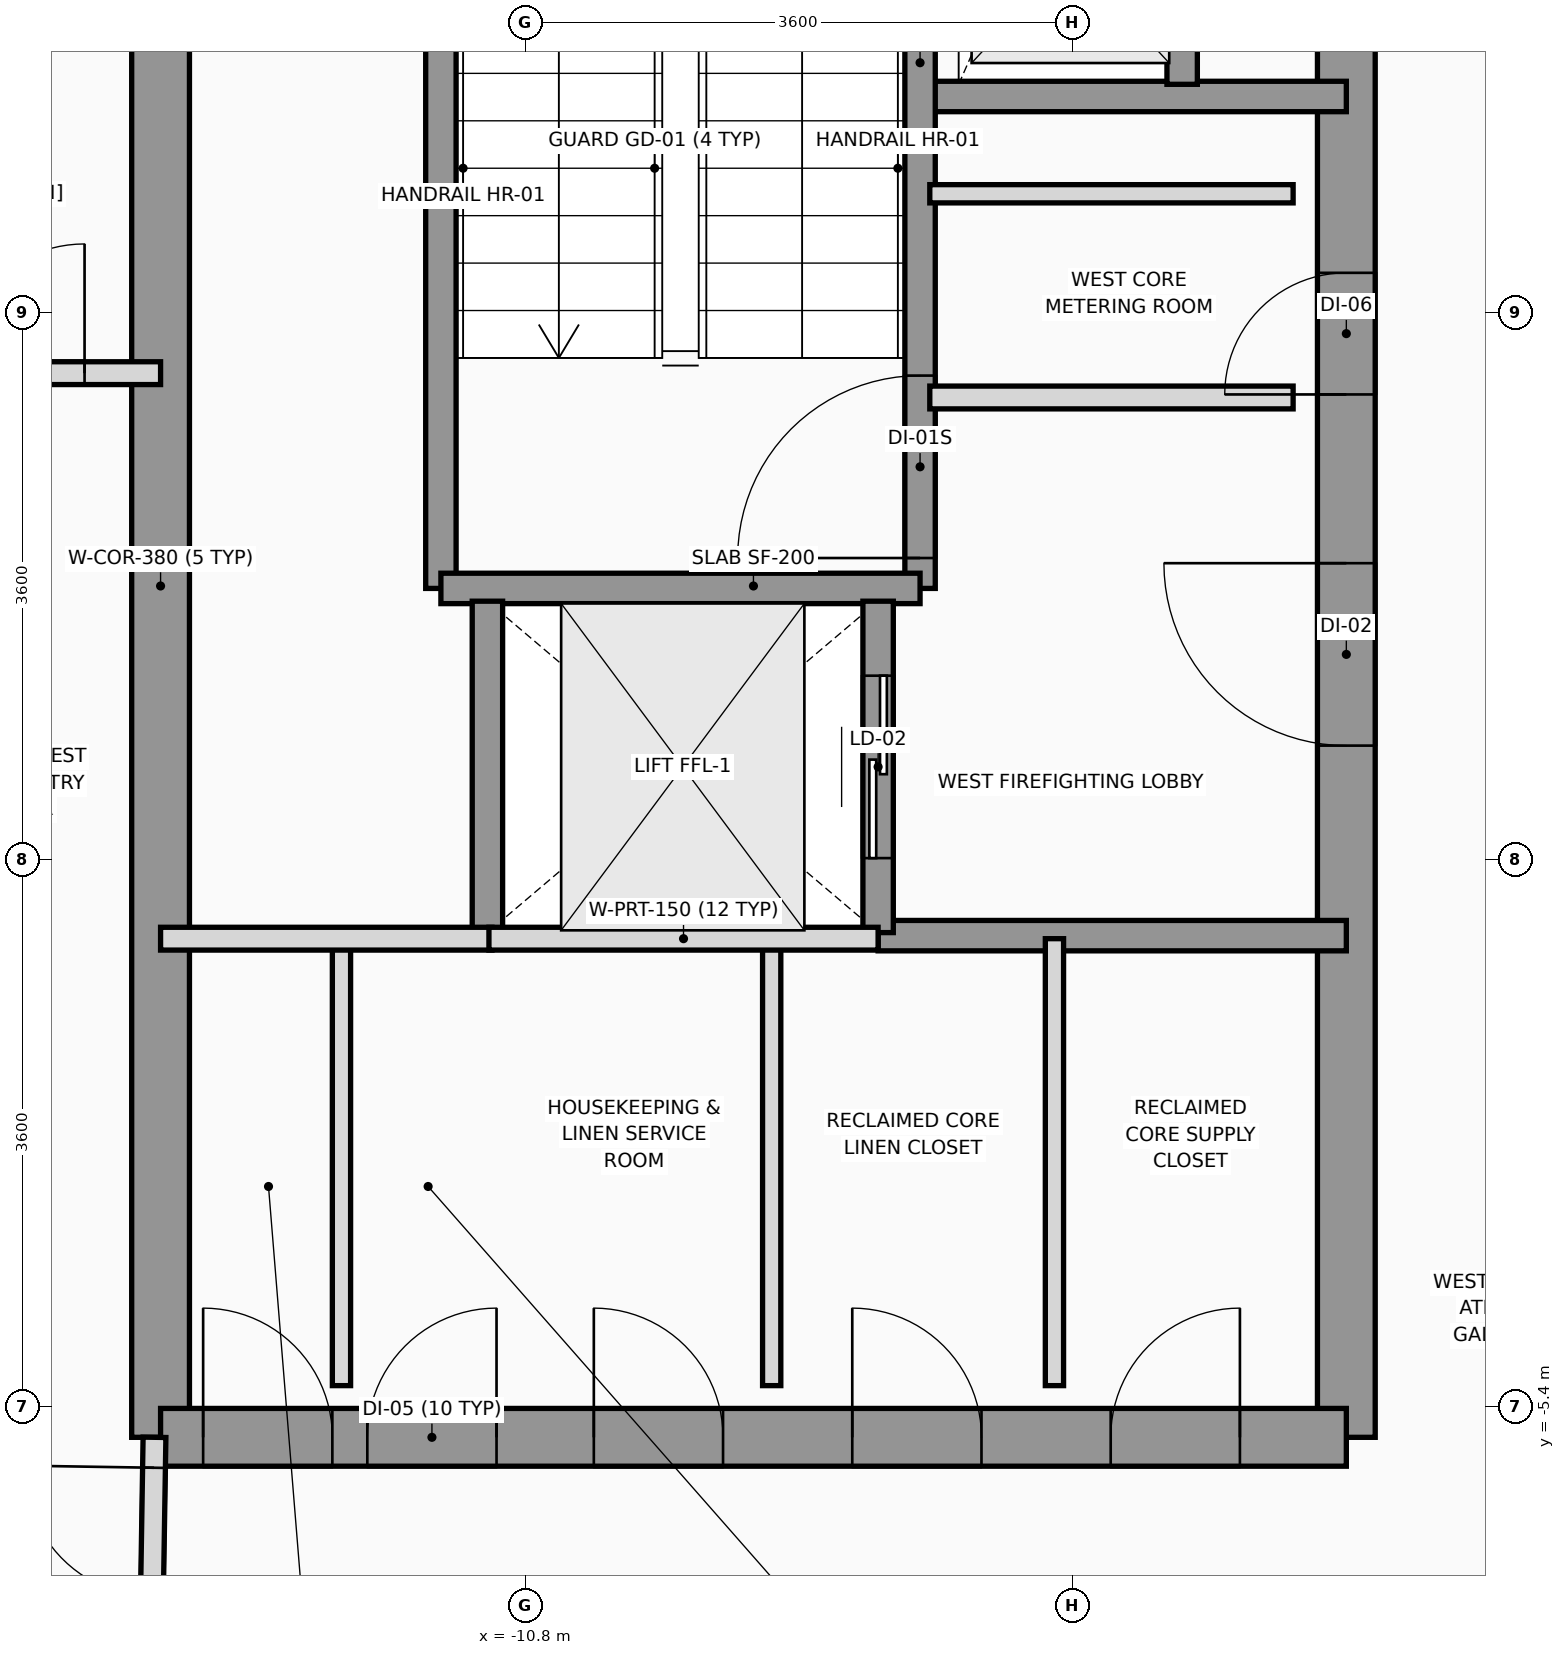
"""IFC4 building model, lengths in metres.
Left out: names, types, materials, properties, quantities, classifications, styles, units other than length and angle.
Written with IfcOpenShell. Run it as: python <this file> out.ifc"""

import sys

from ifc_helpers import new_model, si_unit, direction, frame, frame_2d, origin, place, context, subcontext, project, spatial, rectangle, extrude, source, transform, mapped, element, fill, save


model = new_model("IFC4")
c1 = context("Model", 3, precision=1e-05, world=origin(), true_north=direction((0.0, 1.0)))
c2 = subcontext(c1, "Body", "Model", "MODEL_VIEW")
j1 = project(units=[si_unit("LENGTHUNIT", "METRE"), si_unit("PLANEANGLEUNIT", "RADIAN")], contexts=[c1])
p1 = place(None, origin())
s1 = spatial("IfcSite", under=j1, at=p1, CompositionType="ELEMENT")
p2 = place(p1, origin())
s2 = spatial("IfcBuilding", under=s1, at=p2, CompositionType="ELEMENT")
p3 = place(p2, frame((0.0, 0.0, 184.2)))
s3 = spatial("IfcBuildingStorey", under=s2, at=p3, CompositionType="ELEMENT", Elevation=184.2)
p4 = place(p3, frame((-13.2, -5.6, 0.0), z_axis=(0.0, 0.0, 1.0), x_axis=(0.0, 1.0, 0.0)))
e1 = element("IfcWall", 1, at=p4, inside=s3, PredefinedType="SHEAR", context=c2, shape_type="SweptSolid", body=[
    extrude(rectangle(XDim=11.2, YDim=0.38, at=frame_2d((5.6, 0.0))), origin(), (0.0, 0.0, 1.0), 3.2),
])
p5 = place(p3, frame((-5.4, -5.6, 0.0), z_axis=(0.0, 0.0, 1.0), x_axis=(0.0, 1.0, 0.0)))
e2 = element("IfcWall", 2, at=p5, inside=s3, PredefinedType="SHEAR", context=c2, shape_type="SweptSolid", body=[
    extrude(rectangle(XDim=12.5, YDim=0.38, at=frame_2d((6.25, 0.0))), origin(), (0.0, 0.0, 1.0), 3.2),
])
p6 = place(p5, frame((4.55, 0.0, 0.0)))
e3 = element("IfcOpeningElement", 3, at=p6, cuts=e2, PredefinedType="OPENING", context=c2, shape_type="SweptSolid", body=[
    extrude(rectangle(XDim=1.2, YDim=2.2, at=frame_2d((0.6, 1.1))), frame((0.0, 0.2, 0.0), z_axis=(0.0, -1.0, 0.0), x_axis=(1.0, 0.0, 0.0)), (0.0, 0.0, 1.0), 0.4),
])
p7 = place(p5, frame((10.45, 0.0, 0.0)))
e4 = element("IfcOpeningElement", 4, at=p7, cuts=e2, PredefinedType="OPENING", context=c2, shape_type="SweptSolid", body=[
    extrude(rectangle(XDim=1.2, YDim=2.2, at=frame_2d((0.6, 1.1))), frame((0.0, 0.2, 0.0), z_axis=(0.0, -1.0, 0.0), x_axis=(1.0, 0.0, 0.0)), (0.0, 0.0, 1.0), 0.4),
])
p8 = place(p5, frame((6.86, 0.0, 0.0)))
e5 = element("IfcOpeningElement", 5, at=p8, cuts=e2, PredefinedType="OPENING", context=c2, shape_type="SweptSolid", body=[
    extrude(rectangle(XDim=0.8, YDim=2.1, at=frame_2d((0.4, 1.05))), frame((0.0, 0.2, 0.0), z_axis=(0.0, -1.0, 0.0), x_axis=(1.0, 0.0, 0.0)), (0.0, 0.0, 1.0), 0.4),
])
p9 = place(p3, frame((-13.2, -5.6, 0.0), z_axis=(0.0, 0.0, 1.0), x_axis=(1.0, 0.0, 0.0)))
e6 = element("IfcWall", 6, at=p9, inside=s3, PredefinedType="SHEAR", context=c2, shape_type="SweptSolid", body=[
    extrude(rectangle(XDim=7.8, YDim=0.38, at=frame_2d((3.9, 0.0))), origin(), (0.0, 0.0, 1.0), 3.2),
])
p10 = place(p9, frame((0.28, 0.0, 0.0)))
e7 = element("IfcOpeningElement", 7, at=p10, cuts=e6, PredefinedType="OPENING", context=c2, shape_type="SweptSolid", body=[
    extrude(rectangle(XDim=0.85, YDim=2.1, at=frame_2d((0.425, 1.05))), frame((0.0, 0.2, 0.0), z_axis=(0.0, -1.0, 0.0), x_axis=(1.0, 0.0, 0.0)), (0.0, 0.0, 1.0), 0.4),
])
p11 = place(p9, frame((1.36, 0.0, 0.0)))
e8 = element("IfcOpeningElement", 8, at=p11, cuts=e6, PredefinedType="OPENING", context=c2, shape_type="SweptSolid", body=[
    extrude(rectangle(XDim=0.85, YDim=2.1, at=frame_2d((0.425, 1.05))), frame((0.0, 0.2, 0.0), z_axis=(0.0, -1.0, 0.0), x_axis=(1.0, 0.0, 0.0)), (0.0, 0.0, 1.0), 0.4),
])
p12 = place(p9, frame((2.85, 0.0, 0.0)))
e9 = element("IfcOpeningElement", 9, at=p12, cuts=e6, PredefinedType="OPENING", context=c2, shape_type="SweptSolid", body=[
    extrude(rectangle(XDim=0.85, YDim=2.1, at=frame_2d((0.425, 1.05))), frame((0.0, 0.2, 0.0), z_axis=(0.0, -1.0, 0.0), x_axis=(1.0, 0.0, 0.0)), (0.0, 0.0, 1.0), 0.4),
])
p13 = place(p9, frame((4.55, 0.0, 0.0)))
e10 = element("IfcOpeningElement", 10, at=p13, cuts=e6, PredefinedType="OPENING", context=c2, shape_type="SweptSolid", body=[
    extrude(rectangle(XDim=0.85, YDim=2.1, at=frame_2d((0.425, 1.05))), frame((0.0, 0.2, 0.0), z_axis=(0.0, -1.0, 0.0), x_axis=(1.0, 0.0, 0.0)), (0.0, 0.0, 1.0), 0.4),
])
p14 = place(p9, frame((6.25, 0.0, 0.0)))
e11 = element("IfcOpeningElement", 11, at=p14, cuts=e6, PredefinedType="OPENING", context=c2, shape_type="SweptSolid", body=[
    extrude(rectangle(XDim=0.85, YDim=2.1, at=frame_2d((0.425, 1.05))), frame((0.0, 0.2, 0.0), z_axis=(0.0, -1.0, 0.0), x_axis=(1.0, 0.0, 0.0)), (0.0, 0.0, 1.0), 0.4),
])
p15 = place(p3, frame((-8.18, 3.22, 0.0), z_axis=(0.0, 0.0, 1.0), x_axis=(1.0, 0.0, 0.0)))
e12 = element("IfcWall", 12, at=p15, inside=s3, PredefinedType="SOLIDWALL", context=c2, shape_type="SweptSolid", body=[
    extrude(rectangle(XDim=2.78, YDim=0.2, at=frame_2d((1.39, 0.0))), origin(), (0.0, 0.0, 1.0), 3.2),
])
p16 = place(p3, frame((-8.48, -2.3, 0.0), z_axis=(0.0, 0.0, 1.0), x_axis=(1.0, 0.0, 0.0)))
e13 = element("IfcWall", 13, at=p16, inside=s3, PredefinedType="SOLIDWALL", context=c2, shape_type="SweptSolid", body=[
    extrude(rectangle(XDim=3.08, YDim=0.2, at=frame_2d((1.54, 0.0))), origin(), (0.0, 0.0, 1.0), 3.2),
])
p17 = place(p3, frame((-8.204, -0.016, 0.0), z_axis=(0.0, 0.0, 1.0), x_axis=(0.0, 1.0, 0.0)))
e14 = element("IfcWall", 14, at=p17, inside=s3, PredefinedType="SOLIDWALL", context=c2, shape_type="SweptSolid", body=[
    extrude(rectangle(XDim=6.916, YDim=0.2, at=frame_2d((3.458, 0.0))), origin(), (0.0, 0.0, 1.0), 3.2),
])
p18 = place(p17, frame((0.2, 0.0, 0.0)))
e15 = element("IfcOpeningElement", 15, at=p18, cuts=e14, PredefinedType="OPENING", context=c2, shape_type="SweptSolid", body=[
    extrude(rectangle(XDim=1.2, YDim=2.2, at=frame_2d((0.6, 1.1))), frame((0.0, 0.11, 0.0), z_axis=(0.0, -1.0, 0.0), x_axis=(1.0, 0.0, 0.0)), (0.0, 0.0, 1.0), 0.22),
])
p19 = place(p3, frame((-11.356, -0.016, 0.0), z_axis=(0.0, 0.0, 1.0), x_axis=(0.0, 1.0, 0.0)))
e16 = element("IfcWall", 16, at=p19, inside=s3, PredefinedType="SOLIDWALL", context=c2, shape_type="SweptSolid", body=[
    extrude(rectangle(XDim=6.916, YDim=0.2, at=frame_2d((3.458, 0.0))), origin(), (0.0, 0.0, 1.0), 3.2),
])
p20 = place(p3, frame((-11.356, -0.016, 0.0), z_axis=(0.0, 0.0, 1.0), x_axis=(1.0, 0.0, 0.0)))
e17 = element("IfcWall", 17, at=p20, inside=s3, PredefinedType="SOLIDWALL", context=c2, shape_type="SweptSolid", body=[
    extrude(rectangle(XDim=3.152, YDim=0.2, at=frame_2d((1.576, 0.0))), origin(), (0.0, 0.0, 1.0), 3.2),
])
p21 = place(p3, frame((-11.05, -2.28, 0.0), z_axis=(0.0, 0.0, 1.0), x_axis=(0.0, 1.0, 0.0)))
e18 = element("IfcWall", 18, at=p21, inside=s3, PredefinedType="SOLIDWALL", context=c2, shape_type="SweptSolid", body=[
    extrude(rectangle(XDim=2.18, YDim=0.2, at=frame_2d((1.09, 0.0))), origin(), (0.0, 0.0, 1.0), 3.2),
])
p22 = place(p3, frame((-8.48, -2.28, 0.0), z_axis=(0.0, 0.0, 1.0), x_axis=(0.0, 1.0, 0.0)))
e19 = element("IfcWall", 19, at=p22, inside=s3, PredefinedType="SOLIDWALL", context=c2, shape_type="SweptSolid", body=[
    extrude(rectangle(XDim=2.18, YDim=0.2, at=frame_2d((1.09, 0.0))), origin(), (0.0, 0.0, 1.0), 3.2),
])
p23 = place(p22, frame((0.49, 0.0, 0.0)))
e20 = element("IfcOpeningElement", 20, at=p23, cuts=e19, PredefinedType="OPENING", context=c2, shape_type="SweptSolid", body=[
    extrude(rectangle(XDim=1.2, YDim=2.2, at=frame_2d((0.6, 1.1))), frame((0.0, 0.11, 0.0), z_axis=(0.0, -1.0, 0.0), x_axis=(1.0, 0.0, 0.0)), (0.0, 0.0, 1.0), 0.22),
])
p24 = place(p3, frame((-6.48, 3.3, 0.0), z_axis=(0.0, 0.0, 1.0), x_axis=(0.0, 1.0, 0.0)))
e21 = element("IfcWall", 21, at=p24, inside=s3, PredefinedType="SOLIDWALL", context=c2, shape_type="SweptSolid", body=[
    extrude(rectangle(XDim=1.68, YDim=0.2, at=frame_2d((0.84, 0.0))), origin(), (0.0, 0.0, 1.0), 3.2),
])
p25 = place(p24, frame((0.29, 0.0, 0.0)))
e22 = element("IfcOpeningElement", 22, at=p25, cuts=e21, PredefinedType="OPENING", context=c2, shape_type="SweptSolid", body=[
    extrude(rectangle(XDim=1.1, YDim=2.2, at=frame_2d((0.55, 1.1))), frame((0.0, 0.11, 0.0), z_axis=(0.0, -1.0, 0.0), x_axis=(1.0, 0.0, 0.0)), (0.0, 0.0, 1.0), 0.22),
])
p26 = place(p3, frame((-8.14, 1.24, 0.0), z_axis=(0.0, 0.0, 1.0), x_axis=(1.0, 0.0, 0.0)))
e23 = element("IfcWall", 23, at=p26, inside=s3, PredefinedType="PARTITIONING", context=c2, shape_type="SweptSolid", body=[
    extrude(rectangle(XDim=2.39, YDim=0.15, at=frame_2d((1.195, 0.0))), origin(), (0.0, 0.0, 1.0), 2.3),
])
p27 = place(p3, frame((-8.14, 2.58, 0.0), z_axis=(0.0, 0.0, 1.0), x_axis=(1.0, 0.0, 0.0)))
e24 = element("IfcWall", 24, at=p27, inside=s3, PredefinedType="PARTITIONING", context=c2, shape_type="SweptSolid", body=[
    extrude(rectangle(XDim=2.39, YDim=0.12, at=frame_2d((1.195, 0.0))), origin(), (0.0, 0.0, 1.0), 2.3),
])
p28 = place(p3, frame((-12.01, -5.26, 0.0), z_axis=(0.0, 0.0, 1.0), x_axis=(0.0, 1.0, 0.0)))
e25 = element("IfcWall", 25, at=p28, inside=s3, PredefinedType="PARTITIONING", context=c2, shape_type="SweptSolid", body=[
    extrude(rectangle(XDim=2.94, YDim=0.12, at=frame_2d((1.47, 0.0))), origin(), (0.0, 0.0, 1.0), 3.2),
])
p29 = place(p3, frame((-13.2, -2.32, 0.0), z_axis=(0.0, 0.0, 1.0), x_axis=(1.0, 0.0, 0.0)))
e26 = element("IfcWall", 26, at=p29, inside=s3, PredefinedType="PARTITIONING", context=c2, shape_type="SweptSolid", body=[
    extrude(rectangle(XDim=2.18, YDim=0.15, at=frame_2d((1.09, 0.0))), origin(), (0.0, 0.0, 1.0), 3.2),
])
for number, where, z_axis, x_axis in (
    (27, (-9.18, -5.26, 0.0), (0.0, 0.0, 1.0), (0.0, 1.0, 0.0)),
    (28, (-7.32, -5.26, 0.0), (0.0, 0.0, 1.0), (0.0, 1.0, 0.0)),
):
    element("IfcWall", number, at=place(p3, frame(where, z_axis=z_axis, x_axis=x_axis)), inside=s3, PredefinedType="PARTITIONING", context=c2, shape_type="SweptSolid", body=[
        extrude(rectangle(XDim=2.94, YDim=0.12, at=frame_2d((1.47, 0.0))), origin(), (0.0, 0.0, 1.0), 3.2),
    ])
p30 = place(p3, frame((-11.04, -2.32, 0.0), z_axis=(0.0, 0.0, 1.0), x_axis=(1.0, 0.0, 0.0)))
e29 = element("IfcWall", 29, at=p30, inside=s3, PredefinedType="PARTITIONING", context=c2, shape_type="SweptSolid", body=[
    extrude(rectangle(XDim=2.56, YDim=0.15, at=frame_2d((1.28, 0.0))), origin(), (0.0, 0.0, 1.0), 3.2),
])
p31 = place(p3, frame((-13.26, -6.85, 0.0), z_axis=(0.0, 0.0, 1.0), x_axis=(0.016013571389, 0.999871774545, 0.0)))
e30 = element("IfcWall", 30, at=p31, inside=s3, PredefinedType="PARTITIONING", context=c2, shape_type="SweptSolid", body=[
    extrude(rectangle(XDim=1.25, YDim=0.15, at=frame_2d((0.625, 0.0))), origin(), (0.0, 0.0, 1.0), 3.2),
])
p32 = place(p31, frame((0.2, 0.0, 0.0)))
e31 = element("IfcOpeningElement", 31, at=p32, cuts=e30, PredefinedType="OPENING", context=c2, shape_type="SweptSolid", body=[
    extrude(rectangle(XDim=0.85, YDim=2.1, at=frame_2d((0.425, 1.05))), frame((0.0, 0.085, 0.0), z_axis=(0.0, -1.0, 0.0), x_axis=(1.0, 0.0, 0.0)), (0.0, 0.0, 1.0), 0.17),
])
p33 = place(p3, frame((-17.65, 1.4, 0.0), z_axis=(0.0, 0.0, 1.0), x_axis=(1.0, 0.0, 0.0)))
e32 = element("IfcWall", 32, at=p33, inside=s3, PredefinedType="PARTITIONING", context=c2, shape_type="SweptSolid", body=[
    extrude(rectangle(XDim=4.45, YDim=0.15, at=frame_2d((2.225, 0.0))), origin(), (0.0, 0.0, 1.0), 2.8),
])
p34 = place(p33, frame((3.1, 0.0, 0.0)))
e33 = element("IfcOpeningElement", 33, at=p34, cuts=e32, PredefinedType="OPENING", context=c2, shape_type="SweptSolid", body=[
    extrude(rectangle(XDim=0.85, YDim=2.1, at=frame_2d((0.425, 1.05))), frame((0.0, 0.085, 0.0), z_axis=(0.0, -1.0, 0.0), x_axis=(1.0, 0.0, 0.0)), (0.0, 0.0, 1.0), 0.17),
])
m1 = source(origin(), c2, "Body", "SweptSolid", [
    extrude(rectangle(XDim=1.2, YDim=2.2, at=frame_2d((0.6, 1.1))), frame((0.0, 0.025, 0.0), z_axis=(0.0, -1.0, 0.0), x_axis=(1.0, 0.0, 0.0)), (0.0, 0.0, 1.0), 0.05),
])
p35 = place(p18, origin())
e34 = element("IfcDoor", 34, at=p35, inside=s3, OperationType="SINGLE_SWING_LEFT", PredefinedType="DOOR", context=c2, shape_type="MappedRepresentation", body=[
    mapped(m1, transform((0.0, 0.0, 0.0), x_axis=(1.0, 0.0, 0.0), y_axis=(0.0, 1.0, 0.0), z_axis=(0.0, 0.0, 1.0), scale=1.0)),
])
fill(e15, e34)
p36 = place(p6, origin())
e35 = element("IfcDoor", 35, at=p36, inside=s3, OperationType="SINGLE_SWING_RIGHT", PredefinedType="DOOR", context=c2, shape_type="MappedRepresentation", body=[
    mapped(m1, transform((0.0, 0.0, 0.0), x_axis=(1.0, 0.0, 0.0), y_axis=(0.0, 1.0, 0.0), z_axis=(0.0, 0.0, 1.0), scale=1.0)),
])
fill(e3, e35)
m2 = source(origin(), c2, "Body", "SweptSolid", [
    extrude(rectangle(XDim=0.8, YDim=2.1, at=frame_2d((0.4, 1.05))), frame((0.0, 0.025, 0.0), z_axis=(0.0, -1.0, 0.0), x_axis=(1.0, 0.0, 0.0)), (0.0, 0.0, 1.0), 0.05),
])
p37 = place(p8, origin())
e36 = element("IfcDoor", 36, at=p37, inside=s3, OperationType="SINGLE_SWING_LEFT", PredefinedType="DOOR", context=c2, shape_type="MappedRepresentation", body=[
    mapped(m2, transform((0.0, 0.0, 0.0), x_axis=(1.0, 0.0, 0.0), y_axis=(0.0, 1.0, 0.0), z_axis=(0.0, 0.0, 1.0), scale=1.0)),
])
fill(e5, e36)
m3 = source(origin(), c2, "Body", "SweptSolid", [
    extrude(rectangle(XDim=0.85, YDim=2.1, at=frame_2d((0.425, 1.05))), frame((0.0, 0.025, 0.0), z_axis=(0.0, -1.0, 0.0), x_axis=(1.0, 0.0, 0.0)), (0.0, 0.0, 1.0), 0.05),
])
p38 = place(p10, origin())
e37 = element("IfcDoor", 37, at=p38, inside=s3, OperationType="SINGLE_SWING_LEFT", PredefinedType="DOOR", context=c2, shape_type="MappedRepresentation", body=[
    mapped(m3, transform((0.0, 0.0, 0.0), x_axis=(1.0, 0.0, 0.0), y_axis=(0.0, 1.0, 0.0), z_axis=(0.0, 0.0, 1.0), scale=1.0)),
])
fill(e7, e37)
p39 = place(p11, origin())
e38 = element("IfcDoor", 38, at=p39, inside=s3, OperationType="SINGLE_SWING_RIGHT", PredefinedType="DOOR", context=c2, shape_type="MappedRepresentation", body=[
    mapped(m3, transform((0.0, 0.0, 0.0), x_axis=(1.0, 0.0, 0.0), y_axis=(0.0, 1.0, 0.0), z_axis=(0.0, 0.0, 1.0), scale=1.0)),
])
fill(e8, e38)
p40 = place(p12, origin())
e39 = element("IfcDoor", 39, at=p40, inside=s3, OperationType="SINGLE_SWING_LEFT", PredefinedType="DOOR", context=c2, shape_type="MappedRepresentation", body=[
    mapped(m3, transform((0.0, 0.0, 0.0), x_axis=(1.0, 0.0, 0.0), y_axis=(0.0, 1.0, 0.0), z_axis=(0.0, 0.0, 1.0), scale=1.0)),
])
fill(e9, e39)
p41 = place(p13, origin())
e40 = element("IfcDoor", 40, at=p41, inside=s3, OperationType="SINGLE_SWING_LEFT", PredefinedType="DOOR", context=c2, shape_type="MappedRepresentation", body=[
    mapped(m3, transform((0.0, 0.0, 0.0), x_axis=(1.0, 0.0, 0.0), y_axis=(0.0, 1.0, 0.0), z_axis=(0.0, 0.0, 1.0), scale=1.0)),
])
fill(e10, e40)
p42 = place(p14, origin())
e41 = element("IfcDoor", 41, at=p42, inside=s3, OperationType="SINGLE_SWING_RIGHT", PredefinedType="DOOR", context=c2, shape_type="MappedRepresentation", body=[
    mapped(m3, transform((0.0, 0.0, 0.0), x_axis=(1.0, 0.0, 0.0), y_axis=(0.0, 1.0, 0.0), z_axis=(0.0, 0.0, 1.0), scale=1.0)),
])
fill(e11, e41)
p43 = place(p23, origin())
e42 = element("IfcDoor", 42, at=p43, inside=s3, OperationType="SLIDING_TO_RIGHT", PredefinedType="DOOR", context=c2, shape_type="MappedRepresentation", body=[
    mapped(m1, transform((0.0, 0.0, 0.0), x_axis=(1.0, 0.0, 0.0), y_axis=(0.0, 1.0, 0.0), z_axis=(0.0, 0.0, 1.0), scale=1.0)),
])
fill(e20, e42)
p44 = place(p32, origin())
e43 = element("IfcDoor", 43, at=p44, inside=s3, OperationType="SINGLE_SWING_RIGHT", PredefinedType="DOOR", context=c2, shape_type="MappedRepresentation", body=[
    mapped(m3, transform((0.0, 0.0, 0.0), x_axis=(1.0, 0.0, 0.0), y_axis=(0.0, 1.0, 0.0), z_axis=(0.0, 0.0, 1.0), scale=1.0)),
])
fill(e31, e43)
p45 = place(p34, origin())
e44 = element("IfcDoor", 44, at=p45, inside=s3, OperationType="SINGLE_SWING_RIGHT", PredefinedType="DOOR", context=c2, shape_type="MappedRepresentation", body=[
    mapped(m3, transform((0.0, 0.0, 0.0), x_axis=(1.0, 0.0, 0.0), y_axis=(0.0, 1.0, 0.0), z_axis=(0.0, 0.0, 1.0), scale=1.0)),
])
fill(e33, e44)
save(model, sys.argv[1])
